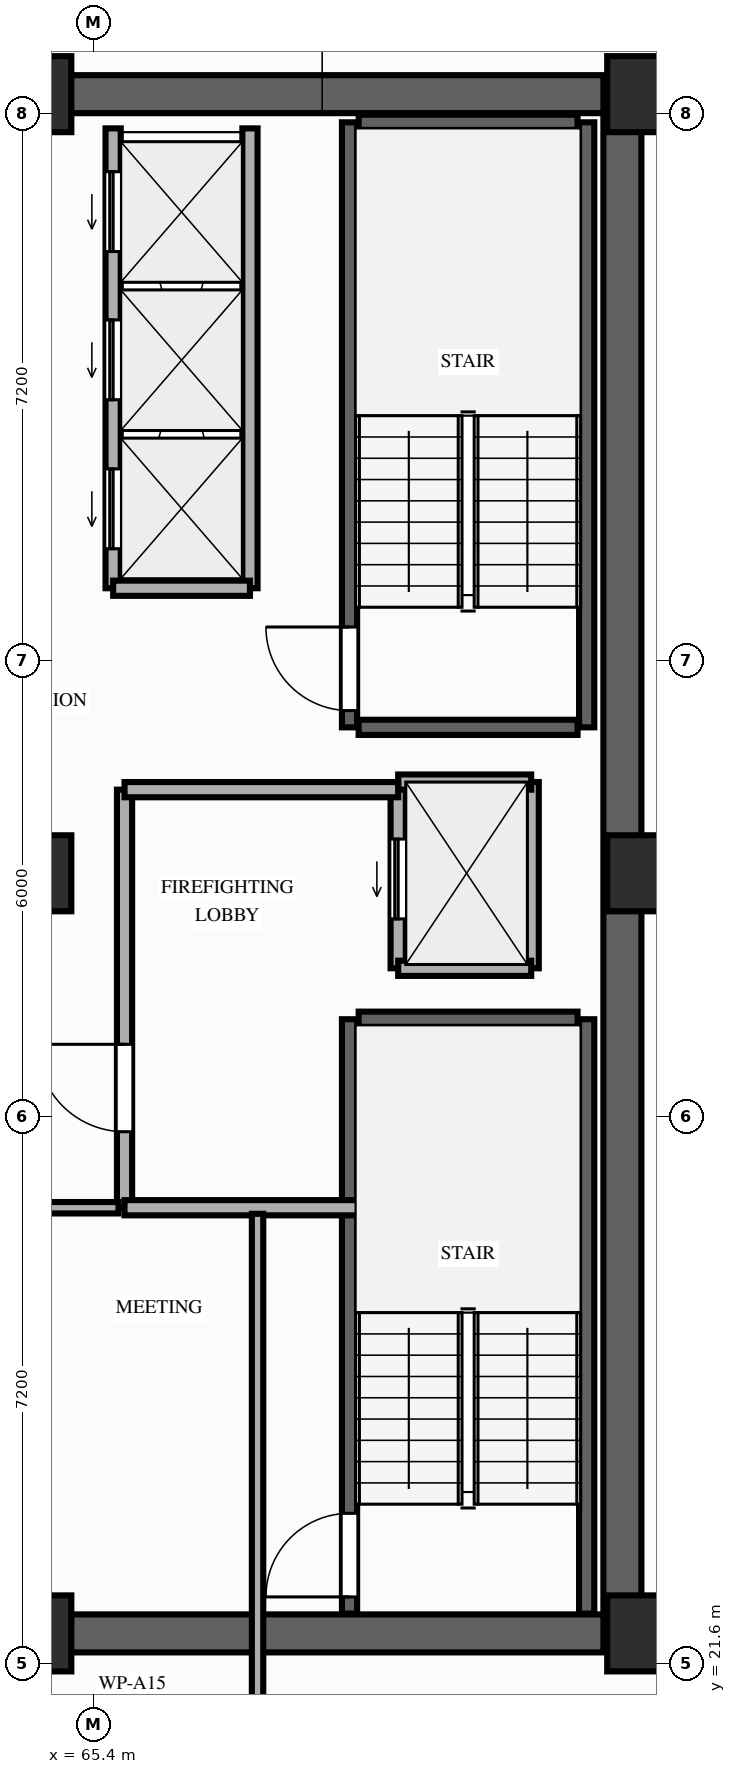
"""IFC4 building model, lengths in metres.
Left out: names, types, materials, properties, quantities, classifications, styles, units other than length and angle.
Written with IfcOpenShell. Run it as: python <this file> out.ifc"""

import sys

from ifc_helpers import new_model, si_unit, direction, frame, frame_2d, origin, origin_2d, place, context, subcontext, project, spatial, rectangle, extrude, element, fill, save


model = new_model("IFC4")
c1 = context("Model", 3, precision=1e-05, world=origin(), true_north=direction((0.0, 1.0)))
c2 = subcontext(c1, "Body", "Model", "MODEL_VIEW")
j1 = project(units=[si_unit("LENGTHUNIT", "METRE"), si_unit("PLANEANGLEUNIT", "RADIAN")], contexts=[c1])
p1 = place(None, origin())
s1 = spatial("IfcSite", under=j1, at=p1, CompositionType="ELEMENT")
p2 = place(p1, origin())
s2 = spatial("IfcBuilding", under=s1, at=p2, CompositionType="ELEMENT")
p3 = place(p2, frame((0.0, 0.0, 30.2)))
s3 = spatial("IfcBuildingStorey", under=s2, at=p3, CompositionType="ELEMENT", Elevation=30.2)
for number, where, z_axis, x_axis in (
    (1, (64.6, 22.0, 0.0), (0.0, 0.0, 1.0), (1.0, 0.0, 0.0)),
    (2, (72.65, 22.0, 0.0), (0.0, 0.0, 1.0), (1.0, 0.0, 0.0)),
    (3, (64.6, 32.0, 0.0), (0.0, 0.0, 1.0), (1.0, 0.0, 0.0)),
    (4, (72.65, 32.0, 0.0), (0.0, 0.0, 1.0), (1.0, 0.0, 0.0)),
    (5, (64.6, 42.25, 0.0), (0.0, 0.0, 1.0), (1.0, 0.0, 0.0)),
    (6, (72.65, 42.25, 0.0), (0.0, 0.0, 1.0), (1.0, 0.0, 0.0)),
):
    element("IfcColumn", number, at=place(p3, frame(where, z_axis=z_axis, x_axis=x_axis)), inside=s3, PredefinedType="COLUMN", context=c2, shape_type="SweptSolid", body=[
        extrude(rectangle(XDim=1.0, YDim=1.0, at=origin_2d()), origin(), (0.0, 0.0, 1.0), 3.2),
    ])
p4 = place(p3, frame((72.35, 22.0, 0.0), z_axis=(0.0, 0.0, 1.0), x_axis=(0.0, 1.0, 0.0)))
e7 = element("IfcWall", 7, at=p4, inside=s3, PredefinedType="SHEAR", context=c2, shape_type="SweptSolid", body=[
    extrude(rectangle(XDim=20.25, YDim=0.5, at=frame_2d((10.125, 0.0))), origin(), (0.0, 0.0, 1.0), 3.02),
])
for number, where, z_axis, x_axis in (
    (8, (64.6, 42.25, 0.0), (0.0, 0.0, 1.0), (1.0, 0.0, 0.0)),
    (9, (64.6, 22.0, 0.0), (0.0, 0.0, 1.0), (1.0, 0.0, 0.0)),
):
    element("IfcWall", number, at=place(p3, frame(where, z_axis=z_axis, x_axis=x_axis)), inside=s3, PredefinedType="SHEAR", context=c2, shape_type="SweptSolid", body=[
        extrude(rectangle(XDim=7.5, YDim=0.5, at=frame_2d((3.75, 0.0))), origin(), (0.0, 0.0, 1.0), 3.02),
    ])
p5 = place(p3, frame((68.76, 22.26, 0.0), z_axis=(0.0, 0.0, 1.0), x_axis=(0.0, 1.0, 0.0)))
e10 = element("IfcWall", 10, at=p5, inside=s3, PredefinedType="SHEAR", context=c2, shape_type="SweptSolid", body=[
    extrude(rectangle(XDim=7.82, YDim=0.2, at=frame_2d((3.91, 0.0))), origin(), (0.0, 0.0, 1.0), 3.02),
])
p6 = place(p5, frame((0.22, 0.0, 0.0)))
e11 = element("IfcOpeningElement", 11, at=p6, cuts=e10, PredefinedType="OPENING", context=c2, shape_type="SweptSolid", body=[
    extrude(rectangle(XDim=1.1, YDim=2.15, at=frame_2d((0.55, 1.075))), frame((0.0, 0.11, 0.0), z_axis=(0.0, -1.0, 0.0), x_axis=(1.0, 0.0, 0.0)), (0.0, 0.0, 1.0), 0.22),
])
p7 = place(p3, frame((71.88, 22.26, 0.0), z_axis=(0.0, 0.0, 1.0), x_axis=(0.0, 1.0, 0.0)))
e12 = element("IfcWall", 12, at=p7, inside=s3, PredefinedType="SHEAR", context=c2, shape_type="SweptSolid", body=[
    extrude(rectangle(XDim=7.82, YDim=0.2, at=frame_2d((3.91, 0.0))), origin(), (0.0, 0.0, 1.0), 3.02),
])
p8 = place(p3, frame((68.88, 30.08, 0.0), z_axis=(0.0, 0.0, 1.0), x_axis=(1.0, 0.0, 0.0)))
e13 = element("IfcWall", 13, at=p8, inside=s3, PredefinedType="SHEAR", context=c2, shape_type="SweptSolid", body=[
    extrude(rectangle(XDim=2.88, YDim=0.2, at=frame_2d((1.44, 0.0))), origin(), (0.0, 0.0, 1.0), 3.02),
])
p9 = place(p3, frame((68.76, 33.92, 0.0), z_axis=(0.0, 0.0, 1.0), x_axis=(0.0, 1.0, 0.0)))
e14 = element("IfcWall", 14, at=p9, inside=s3, PredefinedType="SHEAR", context=c2, shape_type="SweptSolid", body=[
    extrude(rectangle(XDim=7.96, YDim=0.2, at=frame_2d((3.98, 0.0))), origin(), (0.0, 0.0, 1.0), 3.02),
])
p10 = place(p9, frame((0.22, 0.0, 0.0)))
e15 = element("IfcOpeningElement", 15, at=p10, cuts=e14, PredefinedType="OPENING", context=c2, shape_type="SweptSolid", body=[
    extrude(rectangle(XDim=1.1, YDim=2.15, at=frame_2d((0.55, 1.075))), frame((0.0, 0.11, 0.0), z_axis=(0.0, -1.0, 0.0), x_axis=(1.0, 0.0, 0.0)), (0.0, 0.0, 1.0), 0.22),
])
p11 = place(p3, frame((71.88, 33.92, 0.0), z_axis=(0.0, 0.0, 1.0), x_axis=(0.0, 1.0, 0.0)))
e16 = element("IfcWall", 16, at=p11, inside=s3, PredefinedType="SHEAR", context=c2, shape_type="SweptSolid", body=[
    extrude(rectangle(XDim=7.96, YDim=0.2, at=frame_2d((3.98, 0.0))), origin(), (0.0, 0.0, 1.0), 3.02),
])
for number, where, z_axis, x_axis in (
    (17, (68.88, 41.88, 0.0), (0.0, 0.0, 1.0), (1.0, 0.0, 0.0)),
    (18, (68.88, 33.92, 0.0), (0.0, 0.0, 1.0), (1.0, 0.0, 0.0)),
):
    element("IfcWall", number, at=place(p3, frame(where, z_axis=z_axis, x_axis=x_axis)), inside=s3, PredefinedType="SHEAR", context=c2, shape_type="SweptSolid", body=[
        extrude(rectangle(XDim=2.88, YDim=0.2, at=frame_2d((1.44, 0.0))), origin(), (0.0, 0.0, 1.0), 3.02),
    ])
p12 = place(p3, frame((65.65, 35.75, 0.0), z_axis=(0.0, 0.0, 1.0), x_axis=(0.0, 1.0, 0.0)))
e19 = element("IfcWall", 19, at=p12, inside=s3, PredefinedType="MOVABLE", context=c2, shape_type="SweptSolid", body=[
    extrude(rectangle(XDim=6.05, YDim=0.2, at=frame_2d((3.025, 0.0))), origin(), (0.0, 0.0, 1.0), 3.02),
])
p13 = place(p12, frame((0.52, 0.0, 0.0)))
e20 = element("IfcOpeningElement", 20, at=p13, cuts=e19, PredefinedType="OPENING", context=c2, shape_type="SweptSolid", body=[
    extrude(rectangle(XDim=1.05, YDim=2.15, at=frame_2d((0.525, 1.075))), frame((0.0, 0.11, 0.0), z_axis=(0.0, -1.0, 0.0), x_axis=(1.0, 0.0, 0.0)), (0.0, 0.0, 1.0), 0.22),
])
p14 = place(p12, frame((2.48, 0.0, 0.0)))
e21 = element("IfcOpeningElement", 21, at=p14, cuts=e19, PredefinedType="OPENING", context=c2, shape_type="SweptSolid", body=[
    extrude(rectangle(XDim=1.05, YDim=2.15, at=frame_2d((0.525, 1.075))), frame((0.0, 0.11, 0.0), z_axis=(0.0, -1.0, 0.0), x_axis=(1.0, 0.0, 0.0)), (0.0, 0.0, 1.0), 0.22),
])
p15 = place(p12, frame((4.43, 0.0, 0.0)))
e22 = element("IfcOpeningElement", 22, at=p15, cuts=e19, PredefinedType="OPENING", context=c2, shape_type="SweptSolid", body=[
    extrude(rectangle(XDim=1.05, YDim=2.15, at=frame_2d((0.525, 1.075))), frame((0.0, 0.11, 0.0), z_axis=(0.0, -1.0, 0.0), x_axis=(1.0, 0.0, 0.0)), (0.0, 0.0, 1.0), 0.22),
])
p16 = place(p3, frame((67.45, 35.75, 0.0), z_axis=(0.0, 0.0, 1.0), x_axis=(0.0, 1.0, 0.0)))
e23 = element("IfcWall", 23, at=p16, inside=s3, PredefinedType="MOVABLE", context=c2, shape_type="SweptSolid", body=[
    extrude(rectangle(XDim=6.05, YDim=0.2, at=frame_2d((3.025, 0.0))), origin(), (0.0, 0.0, 1.0), 3.02),
])
p17 = place(p3, frame((65.65, 35.75, 0.0), z_axis=(0.0, 0.0, 1.0), x_axis=(1.0, 0.0, 0.0)))
e24 = element("IfcWall", 24, at=p17, inside=s3, PredefinedType="MOVABLE", context=c2, shape_type="SweptSolid", body=[
    extrude(rectangle(XDim=1.8, YDim=0.2, at=frame_2d((0.9, 0.0))), origin(), (0.0, 0.0, 1.0), 3.02),
])
p18 = place(p3, frame((69.4, 30.75, 0.0), z_axis=(0.0, 0.0, 1.0), x_axis=(0.0, 1.0, 0.0)))
e25 = element("IfcWall", 25, at=p18, inside=s3, PredefinedType="MOVABLE", context=c2, shape_type="SweptSolid", body=[
    extrude(rectangle(XDim=2.45, YDim=0.2, at=frame_2d((1.225, 0.0))), origin(), (0.0, 0.0, 1.0), 3.02),
])
p19 = place(p18, frame((0.65, 0.0, 0.0)))
e26 = element("IfcOpeningElement", 26, at=p19, cuts=e25, PredefinedType="OPENING", context=c2, shape_type="SweptSolid", body=[
    extrude(rectangle(XDim=1.05, YDim=2.15, at=frame_2d((0.525, 1.075))), frame((0.0, 0.11, 0.0), z_axis=(0.0, -1.0, 0.0), x_axis=(1.0, 0.0, 0.0)), (0.0, 0.0, 1.0), 0.22),
])
p20 = place(p3, frame((71.15, 30.75, 0.0), z_axis=(0.0, 0.0, 1.0), x_axis=(0.0, 1.0, 0.0)))
e27 = element("IfcWall", 27, at=p20, inside=s3, PredefinedType="MOVABLE", context=c2, shape_type="SweptSolid", body=[
    extrude(rectangle(XDim=2.45, YDim=0.2, at=frame_2d((1.225, 0.0))), origin(), (0.0, 0.0, 1.0), 3.02),
])
for number, where, z_axis, x_axis in (
    (28, (69.4, 33.2, 0.0), (0.0, 0.0, 1.0), (1.0, 0.0, 0.0)),
    (29, (69.4, 30.75, 0.0), (0.0, 0.0, 1.0), (1.0, 0.0, 0.0)),
):
    element("IfcWall", number, at=place(p3, frame(where, z_axis=z_axis, x_axis=x_axis)), inside=s3, PredefinedType="MOVABLE", context=c2, shape_type="SweptSolid", body=[
        extrude(rectangle(XDim=1.75, YDim=0.2, at=frame_2d((0.875, 0.0))), origin(), (0.0, 0.0, 1.0), 3.02),
    ])
p21 = place(p3, frame((65.8, 27.6, 0.0), z_axis=(0.0, 0.0, 1.0), x_axis=(0.0, 1.0, 0.0)))
e30 = element("IfcWall", 30, at=p21, inside=s3, PredefinedType="PARTITIONING", context=c2, shape_type="SweptSolid", body=[
    extrude(rectangle(XDim=5.5, YDim=0.2, at=frame_2d((2.75, 0.0))), origin(), (0.0, 0.0, 1.0), 3.02),
])
p22 = place(p21, frame((1.0, 0.0, 0.0)))
e31 = element("IfcOpeningElement", 31, at=p22, cuts=e30, PredefinedType="OPENING", context=c2, shape_type="SweptSolid", body=[
    extrude(rectangle(XDim=1.15, YDim=2.15, at=frame_2d((0.575, 1.075))), frame((0.0, 0.11, 0.0), z_axis=(0.0, -1.0, 0.0), x_axis=(1.0, 0.0, 0.0)), (0.0, 0.0, 1.0), 0.22),
])
p23 = place(p3, frame((65.8, 33.1, 0.0), z_axis=(0.0, 0.0, 1.0), x_axis=(1.0, 0.0, 0.0)))
e32 = element("IfcWall", 32, at=p23, inside=s3, PredefinedType="PARTITIONING", context=c2, shape_type="SweptSolid", body=[
    extrude(rectangle(XDim=3.6, YDim=0.2, at=frame_2d((1.8, 0.0))), origin(), (0.0, 0.0, 1.0), 3.02),
])
p24 = place(p3, frame((65.8, 27.6, 0.0), z_axis=(0.0, 0.0, 1.0), x_axis=(1.0, 0.0, 0.0)))
e33 = element("IfcWall", 33, at=p24, inside=s3, PredefinedType="PARTITIONING", context=c2, shape_type="SweptSolid", body=[
    extrude(rectangle(XDim=3.4, YDim=0.2, at=frame_2d((1.7, 0.0))), origin(), (0.0, 0.0, 1.0), 3.02),
])
p25 = place(p3, frame((67.55, 21.05, 0.0), z_axis=(0.0, 0.0, 1.0), x_axis=(0.0, 1.0, 0.0)))
e34 = element("IfcWall", 34, at=p25, inside=s3, PredefinedType="PARTITIONING", context=c2, shape_type="SweptSolid", body=[
    extrude(rectangle(XDim=6.47, YDim=0.15, at=frame_2d((3.235, 0.0))), origin(), (0.0, 0.0, 1.0), 2.5),
])
p26 = place(p3, frame((64.25, 27.6, 0.0), z_axis=(0.0, 0.0, 1.0), x_axis=(1.0, 0.0, 0.0)))
e35 = element("IfcWall", 35, at=p26, inside=s3, PredefinedType="PARTITIONING", context=c2, shape_type="SweptSolid", body=[
    extrude(rectangle(XDim=1.47, YDim=0.15, at=frame_2d((0.735, 0.0))), origin(), (0.0, 0.0, 1.0), 2.5),
])
p27 = place(p6, origin())
e36 = element("IfcDoor", 36, at=p27, inside=s3, OperationType="SINGLE_SWING_LEFT", PredefinedType="DOOR", context=c2, shape_type="SweptSolid", body=[
    extrude(rectangle(XDim=1.1, YDim=2.15, at=frame_2d((0.55, 1.075))), frame((0.0, 0.025, 0.0), z_axis=(0.0, -1.0, 0.0), x_axis=(1.0, 0.0, 0.0)), (0.0, 0.0, 1.0), 0.05),
])
fill(e11, e36)
p28 = place(p10, origin())
e37 = element("IfcDoor", 37, at=p28, inside=s3, OperationType="SINGLE_SWING_RIGHT", PredefinedType="DOOR", context=c2, shape_type="SweptSolid", body=[
    extrude(rectangle(XDim=1.1, YDim=2.15, at=frame_2d((0.55, 1.075))), frame((0.0, 0.025, 0.0), z_axis=(0.0, -1.0, 0.0), x_axis=(1.0, 0.0, 0.0)), (0.0, 0.0, 1.0), 0.05),
])
fill(e15, e37)
p29 = place(p13, origin())
e38 = element("IfcDoor", 38, at=p29, inside=s3, OperationType="SLIDING_TO_LEFT", PredefinedType="DOOR", context=c2, shape_type="SweptSolid", body=[
    extrude(rectangle(XDim=1.05, YDim=2.15, at=frame_2d((0.525, 1.075))), frame((0.0, 0.025, 0.0), z_axis=(0.0, -1.0, 0.0), x_axis=(1.0, 0.0, 0.0)), (0.0, 0.0, 1.0), 0.05),
])
fill(e20, e38)
p30 = place(p14, origin())
e39 = element("IfcDoor", 39, at=p30, inside=s3, OperationType="SLIDING_TO_LEFT", PredefinedType="DOOR", context=c2, shape_type="SweptSolid", body=[
    extrude(rectangle(XDim=1.05, YDim=2.15, at=frame_2d((0.525, 1.075))), frame((0.0, 0.025, 0.0), z_axis=(0.0, -1.0, 0.0), x_axis=(1.0, 0.0, 0.0)), (0.0, 0.0, 1.0), 0.05),
])
fill(e21, e39)
p31 = place(p15, origin())
e40 = element("IfcDoor", 40, at=p31, inside=s3, OperationType="SLIDING_TO_LEFT", PredefinedType="DOOR", context=c2, shape_type="SweptSolid", body=[
    extrude(rectangle(XDim=1.05, YDim=2.15, at=frame_2d((0.525, 1.075))), frame((0.0, 0.025, 0.0), z_axis=(0.0, -1.0, 0.0), x_axis=(1.0, 0.0, 0.0)), (0.0, 0.0, 1.0), 0.05),
])
fill(e22, e40)
p32 = place(p19, origin())
e41 = element("IfcDoor", 41, at=p32, inside=s3, OperationType="SLIDING_TO_LEFT", PredefinedType="DOOR", context=c2, shape_type="SweptSolid", body=[
    extrude(rectangle(XDim=1.05, YDim=2.15, at=frame_2d((0.525, 1.075))), frame((0.0, 0.025, 0.0), z_axis=(0.0, -1.0, 0.0), x_axis=(1.0, 0.0, 0.0)), (0.0, 0.0, 1.0), 0.05),
])
fill(e26, e41)
p33 = place(p22, origin())
e42 = element("IfcDoor", 42, at=p33, inside=s3, OperationType="SINGLE_SWING_RIGHT", PredefinedType="DOOR", context=c2, shape_type="SweptSolid", body=[
    extrude(rectangle(XDim=1.15, YDim=2.15, at=frame_2d((0.575, 1.075))), frame((0.0, 0.025, 0.0), z_axis=(0.0, -1.0, 0.0), x_axis=(1.0, 0.0, 0.0)), (0.0, 0.0, 1.0), 0.05),
])
fill(e31, e42)
save(model, sys.argv[1])
